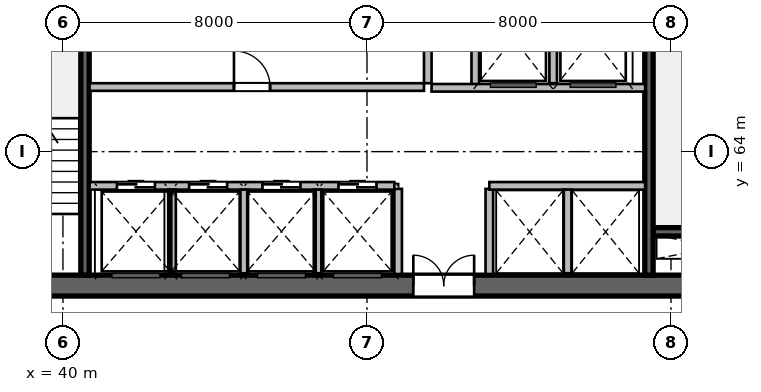
"""IFC4 building model, lengths in metres.
Left out: names, types, materials, properties, quantities, classifications, styles, units other than length and angle.
Written with IfcOpenShell. Run it as: python <this file> out.ifc"""

import sys

from ifc_helpers import new_model, si_unit, direction, frame, frame_2d, origin, place, context, subcontext, project, spatial, rectangle, extrude, source, transform, mapped, element, fill, save


model = new_model("IFC4")
c1 = context("Model", 3, precision=1e-05, world=origin(), true_north=direction((0.0, 1.0)))
c2 = subcontext(c1, "Body", "Model", "MODEL_VIEW")
j1 = project(units=[si_unit("LENGTHUNIT", "METRE"), si_unit("PLANEANGLEUNIT", "RADIAN")], contexts=[c1])
p1 = place(None, origin())
s1 = spatial("IfcSite", under=j1, at=p1, CompositionType="ELEMENT")
p2 = place(p1, origin())
s2 = spatial("IfcBuilding", under=s1, at=p2, CompositionType="ELEMENT")
p3 = place(p2, frame((0.0, 0.0, 64.2)))
s3 = spatial("IfcBuildingStorey", under=s2, at=p3, CompositionType="ELEMENT", Elevation=64.2)
m1 = source(origin(), c2, "Body", "SweptSolid", [
    extrude(rectangle(XDim=21.6, YDim=0.55, at=frame_2d((10.8, 0.0))), origin(), (0.0, 0.0, 1.0), 3.6),
])
p4 = place(p3, frame((37.2, 60.475, 0.0), z_axis=(0.0, 0.0, 1.0), x_axis=(1.0, 0.0, 0.0)))
e1 = element("IfcWall", 1, at=p4, inside=s3, PredefinedType="SHEAR", context=c2, shape_type="MappedRepresentation", body=[
    mapped(m1, transform((0.0, 0.0, 0.0), scale=1.0)),
])
p5 = place(p4, frame((1.1, 0.0, 0.0)))
e2 = element("IfcOpeningElement", 2, at=p5, cuts=e1, PredefinedType="OPENING", context=c2, shape_type="SweptSolid", body=[
    extrude(rectangle(XDim=1.15, YDim=2.15, at=frame_2d((0.575, 1.075))), frame((0.0, 0.285, 0.0), z_axis=(0.0, -1.0, 0.0), x_axis=(1.0, 0.0, 0.0)), (0.0, 0.0, 1.0), 0.57),
])
p6 = place(p4, frame((19.5, 0.0, 0.0)))
e3 = element("IfcOpeningElement", 3, at=p6, cuts=e1, PredefinedType="OPENING", context=c2, shape_type="SweptSolid", body=[
    extrude(rectangle(XDim=0.9, YDim=2.1, at=frame_2d((0.45, 1.05))), frame((0.0, 0.285, 0.0), z_axis=(0.0, -1.0, 0.0), x_axis=(1.0, 0.0, 0.0)), (0.0, 0.0, 1.0), 0.57),
])
p7 = place(p4, frame((12.02, 0.0, 0.0)))
e4 = element("IfcOpeningElement", 4, at=p7, cuts=e1, PredefinedType="OPENING", context=c2, shape_type="SweptSolid", body=[
    extrude(rectangle(XDim=1.6, YDim=2.15, at=frame_2d((0.8, 1.075))), frame((0.0, 0.285, 0.0), z_axis=(0.0, -1.0, 0.0), x_axis=(1.0, 0.0, 0.0)), (0.0, 0.0, 1.0), 0.57),
])
m2 = source(origin(), c2, "Body", "SweptSolid", [
    extrude(rectangle(XDim=3.27, YDim=0.22, at=frame_2d((1.635, 0.0))), origin(), (0.0, 0.0, 1.0), 3.6),
])
p8 = place(p3, frame((55.53, 61.89, 0.0), z_axis=(0.0, 0.0, 1.0), x_axis=(1.0, 0.0, 0.0)))
e5 = element("IfcWall", 5, at=p8, inside=s3, PredefinedType="SHEAR", context=c2, shape_type="MappedRepresentation", body=[
    mapped(m2, transform((0.0, 0.0, 0.0), scale=1.0)),
])
m3 = source(origin(), c2, "Body", "SweptSolid", [
    extrude(rectangle(XDim=10.9, YDim=0.22, at=frame_2d((5.45, 0.0))), origin(), (0.0, 0.0, 1.0), 3.6),
])
p9 = place(p3, frame((40.58, 60.75, 0.0), z_axis=(0.0, 0.0, 1.0), x_axis=(0.0, 1.0, 0.0)))
e6 = element("IfcWall", 6, at=p9, inside=s3, PredefinedType="SHEAR", context=c2, shape_type="MappedRepresentation", body=[
    mapped(m3, transform((0.0, 0.0, 0.0), scale=1.0)),
])
p10 = place(p3, frame((55.42, 60.75, 0.0), z_axis=(0.0, 0.0, 1.0), x_axis=(0.0, 1.0, 0.0)))
e7 = element("IfcWall", 7, at=p10, inside=s3, PredefinedType="SHEAR", context=c2, shape_type="MappedRepresentation", body=[
    mapped(m3, transform((0.0, 0.0, 0.0), scale=1.0)),
])
p11 = place(p10, frame((9.495, 0.0, 0.0)))
e8 = element("IfcOpeningElement", 8, at=p11, cuts=e7, PredefinedType="OPENING", context=c2, shape_type="SweptSolid", body=[
    extrude(rectangle(XDim=1.15, YDim=2.15, at=frame_2d((0.575, 1.075))), frame((0.0, 0.12, 0.0), z_axis=(0.0, -1.0, 0.0), x_axis=(1.0, 0.0, 0.0)), (0.0, 0.0, 1.0), 0.24),
])
m4 = source(origin(), c2, "Body", "SweptSolid", [
    extrude(rectangle(XDim=2.24, YDim=0.2, at=frame_2d((1.12, 0.0))), origin(), (0.0, 0.0, 1.0), 3.36),
])
for number, where, z_axis, x_axis in (
    (9, (48.82, 60.78, 0.0), (0.0, 0.0, 1.0), (0.0, 1.0, 0.0)),
    (10, (51.22, 60.78, 0.0), (0.0, 0.0, 1.0), (0.0, 1.0, 0.0)),
):
    element("IfcWall", number, at=place(p3, frame(where, z_axis=z_axis, x_axis=x_axis)), inside=s3, PredefinedType="SOLIDWALL", context=c2, shape_type="MappedRepresentation", body=[
        mapped(m4, transform((0.0, 0.0, 0.0), scale=1.0)),
    ])
m5 = source(origin(), c2, "Body", "SweptSolid", [
    extrude(rectangle(XDim=5.8, YDim=0.2, at=frame_2d((2.9, 0.0))), origin(), (0.0, 0.0, 1.0), 3.36),
])
p12 = place(p3, frame((49.6, 65.8, 0.0), z_axis=(0.0, 0.0, 1.0), x_axis=(0.0, 1.0, 0.0)))
e11 = element("IfcWall", 11, at=p12, inside=s3, PredefinedType="SOLIDWALL", context=c2, shape_type="MappedRepresentation", body=[
    mapped(m5, transform((0.0, 0.0, 0.0), scale=1.0)),
])
m6 = source(origin(), c2, "Body", "SweptSolid", [
    extrude(rectangle(XDim=2.58, YDim=0.2, at=frame_2d((1.29, 0.0))), origin(), (0.0, 0.0, 1.0), 3.36),
])
p13 = place(p3, frame((50.85, 65.68, 0.0), z_axis=(0.0, 0.0, 1.0), x_axis=(0.0, 1.0, 0.0)))
e12 = element("IfcWall", 12, at=p13, inside=s3, PredefinedType="SOLIDWALL", context=c2, shape_type="MappedRepresentation", body=[
    mapped(m6, transform((0.0, 0.0, 0.0), scale=1.0)),
])
m7 = source(origin(), c2, "Body", "SweptSolid", [
    extrude(rectangle(XDim=2.4, YDim=0.2, at=frame_2d((1.2, 0.0))), origin(), (0.0, 0.0, 1.0), 3.36),
])
p14 = place(p3, frame((52.9, 65.8, 0.0), z_axis=(0.0, 0.0, 1.0), x_axis=(0.0, 1.0, 0.0)))
e13 = element("IfcWall", 13, at=p14, inside=s3, PredefinedType="SOLIDWALL", context=c2, shape_type="MappedRepresentation", body=[
    mapped(m7, transform((0.0, 0.0, 0.0), scale=1.0)),
])
m8 = source(origin(), c2, "Body", "SweptSolid", [
    extrude(rectangle(XDim=5.62, YDim=0.2, at=frame_2d((2.81, 0.0))), origin(), (0.0, 0.0, 1.0), 3.36),
])
p15 = place(p3, frame((49.7, 65.68, 0.0), z_axis=(0.0, 0.0, 1.0), x_axis=(1.0, 0.0, 0.0)))
e14 = element("IfcWall", 14, at=p15, inside=s3, PredefinedType="SOLIDWALL", context=c2, shape_type="MappedRepresentation", body=[
    mapped(m8, transform((0.0, 0.0, 0.0), scale=1.0)),
])
m9 = source(origin(), c2, "Body", "SweptSolid", [
    extrude(rectangle(XDim=8.02, YDim=0.2, at=frame_2d((4.01, 0.0))), origin(), (0.0, 0.0, 1.0), 3.36),
])
p16 = place(p3, frame((40.7, 63.1, 0.0), z_axis=(0.0, 0.0, 1.0), x_axis=(1.0, 0.0, 0.0)))
e15 = element("IfcWall", 15, at=p16, inside=s3, PredefinedType="SOLIDWALL", context=c2, shape_type="MappedRepresentation", body=[
    mapped(m9, transform((0.0, 0.0, 0.0), scale=1.0)),
])
p17 = place(p16, frame((0.72, 0.0, 0.0)))
e16 = element("IfcOpeningElement", 16, at=p17, cuts=e15, PredefinedType="OPENING", context=c2, shape_type="SweptSolid", body=[
    extrude(rectangle(XDim=1.0, YDim=2.15, at=frame_2d((0.5, 1.075))), frame((0.0, 0.11, 0.0), z_axis=(0.0, -1.0, 0.0), x_axis=(1.0, 0.0, 0.0)), (0.0, 0.0, 1.0), 0.22),
])
p18 = place(p16, frame((2.62, 0.0, 0.0)))
e17 = element("IfcOpeningElement", 17, at=p18, cuts=e15, PredefinedType="OPENING", context=c2, shape_type="SweptSolid", body=[
    extrude(rectangle(XDim=1.0, YDim=2.15, at=frame_2d((0.5, 1.075))), frame((0.0, 0.11, 0.0), z_axis=(0.0, -1.0, 0.0), x_axis=(1.0, 0.0, 0.0)), (0.0, 0.0, 1.0), 0.22),
])
p19 = place(p16, frame((4.55, 0.0, 0.0)))
e18 = element("IfcOpeningElement", 18, at=p19, cuts=e15, PredefinedType="OPENING", context=c2, shape_type="SweptSolid", body=[
    extrude(rectangle(XDim=1.0, YDim=2.15, at=frame_2d((0.5, 1.075))), frame((0.0, 0.11, 0.0), z_axis=(0.0, -1.0, 0.0), x_axis=(1.0, 0.0, 0.0)), (0.0, 0.0, 1.0), 0.22),
])
p20 = place(p16, frame((6.55, 0.0, 0.0)))
e19 = element("IfcOpeningElement", 19, at=p20, cuts=e15, PredefinedType="OPENING", context=c2, shape_type="SweptSolid", body=[
    extrude(rectangle(XDim=1.0, YDim=2.15, at=frame_2d((0.5, 1.075))), frame((0.0, 0.11, 0.0), z_axis=(0.0, -1.0, 0.0), x_axis=(1.0, 0.0, 0.0)), (0.0, 0.0, 1.0), 0.22),
])
m10 = source(origin(), c2, "Body", "SweptSolid", [
    extrude(rectangle(XDim=4.1, YDim=0.2, at=frame_2d((2.05, 0.0))), origin(), (0.0, 0.0, 1.0), 3.36),
])
p21 = place(p3, frame((51.22, 63.1, 0.0), z_axis=(0.0, 0.0, 1.0), x_axis=(1.0, 0.0, 0.0)))
e20 = element("IfcWall", 20, at=p21, inside=s3, PredefinedType="SOLIDWALL", context=c2, shape_type="MappedRepresentation", body=[
    mapped(m10, transform((0.0, 0.0, 0.0), scale=1.0)),
])
m11 = source(origin(), c2, "Body", "SweptSolid", [
    extrude(rectangle(XDim=2.2, YDim=0.2, at=frame_2d((1.1, 0.0))), origin(), (0.0, 0.0, 1.0), 3.36),
])
for number, where, z_axis, x_axis in (
    (21, (42.87, 60.8, 0.0), (0.0, 0.0, 1.0), (0.0, 1.0, 0.0)),
    (22, (44.77, 60.8, 0.0), (0.0, 0.0, 1.0), (0.0, 1.0, 0.0)),
    (23, (46.7, 60.8, 0.0), (0.0, 0.0, 1.0), (0.0, 1.0, 0.0)),
    (24, (53.28, 60.8, 0.0), (0.0, 0.0, 1.0), (0.0, 1.0, 0.0)),
):
    element("IfcWall", number, at=place(p3, frame(where, z_axis=z_axis, x_axis=x_axis)), inside=s3, PredefinedType="SOLIDWALL", context=c2, shape_type="MappedRepresentation", body=[
        mapped(m11, transform((0.0, 0.0, 0.0), scale=1.0)),
    ])
m12 = source(origin(), c2, "Body", "SweptSolid", [
    extrude(rectangle(XDim=8.8, YDim=0.2, at=frame_2d((4.4, 0.0))), origin(), (0.0, 0.0, 1.0), 3.36),
])
p22 = place(p3, frame((40.7, 65.7, 0.0), z_axis=(0.0, 0.0, 1.0), x_axis=(1.0, 0.0, 0.0)))
e25 = element("IfcWall", 25, at=p22, inside=s3, PredefinedType="SOLIDWALL", context=c2, shape_type="MappedRepresentation", body=[
    mapped(m12, transform((0.0, 0.0, 0.0), scale=1.0)),
])
p23 = place(p22, frame((3.8, 0.0, 0.0)))
e26 = element("IfcOpeningElement", 26, at=p23, cuts=e25, PredefinedType="OPENING", context=c2, shape_type="SweptSolid", body=[
    extrude(rectangle(XDim=0.95, YDim=2.15, at=frame_2d((0.475, 1.075))), frame((0.0, 0.11, 0.0), z_axis=(0.0, -1.0, 0.0), x_axis=(1.0, 0.0, 0.0)), (0.0, 0.0, 1.0), 0.22),
])
m13 = source(origin(), c2, "Body", "SweptSolid", [
    extrude(rectangle(XDim=1.6, YDim=2.15, at=frame_2d((0.8, 1.075))), frame((0.0, 0.025, 0.0), z_axis=(0.0, -1.0, 0.0), x_axis=(1.0, 0.0, 0.0)), (0.0, 0.0, 1.0), 0.05),
])
p24 = place(p7, origin())
e27 = element("IfcDoor", 27, at=p24, inside=s3, OperationType="DOUBLE_DOOR_SINGLE_SWING", PredefinedType="DOOR", context=c2, shape_type="MappedRepresentation", body=[
    mapped(m13, transform((0.0, 0.0, 0.0), scale=1.0)),
])
fill(e4, e27)
m14 = source(origin(), c2, "Body", "SweptSolid", [
    extrude(rectangle(XDim=1.0, YDim=2.15, at=frame_2d((0.5, 1.075))), frame((0.0, 0.025, 0.0), z_axis=(0.0, -1.0, 0.0), x_axis=(1.0, 0.0, 0.0)), (0.0, 0.0, 1.0), 0.05),
])
p25 = place(p17, origin())
e28 = element("IfcDoor", 28, at=p25, inside=s3, OperationType="DOUBLE_DOOR_SLIDING", PredefinedType="DOOR", context=c2, shape_type="MappedRepresentation", body=[
    mapped(m14, transform((0.0, 0.0, 0.0), scale=1.0)),
])
fill(e16, e28)
p26 = place(p18, origin())
e29 = element("IfcDoor", 29, at=p26, inside=s3, OperationType="DOUBLE_DOOR_SLIDING", PredefinedType="DOOR", context=c2, shape_type="MappedRepresentation", body=[
    mapped(m14, transform((0.0, 0.0, 0.0), scale=1.0)),
])
fill(e17, e29)
p27 = place(p19, origin())
e30 = element("IfcDoor", 30, at=p27, inside=s3, OperationType="DOUBLE_DOOR_SLIDING", PredefinedType="DOOR", context=c2, shape_type="MappedRepresentation", body=[
    mapped(m14, transform((0.0, 0.0, 0.0), scale=1.0)),
])
fill(e18, e30)
p28 = place(p20, origin())
e31 = element("IfcDoor", 31, at=p28, inside=s3, OperationType="DOUBLE_DOOR_SLIDING", PredefinedType="DOOR", context=c2, shape_type="MappedRepresentation", body=[
    mapped(m14, transform((0.0, 0.0, 0.0), scale=1.0)),
])
fill(e19, e31)
m15 = source(origin(), c2, "Body", "SweptSolid", [
    extrude(rectangle(XDim=0.95, YDim=2.15, at=frame_2d((0.475, 1.075))), frame((0.0, 0.025, 0.0), z_axis=(0.0, -1.0, 0.0), x_axis=(1.0, 0.0, 0.0)), (0.0, 0.0, 1.0), 0.05),
])
p29 = place(p23, origin())
e32 = element("IfcDoor", 32, at=p29, inside=s3, OperationType="SINGLE_SWING_LEFT", PredefinedType="DOOR", context=c2, shape_type="MappedRepresentation", body=[
    mapped(m15, transform((0.0, 0.0, 0.0), scale=1.0)),
])
fill(e26, e32)
save(model, sys.argv[1])
